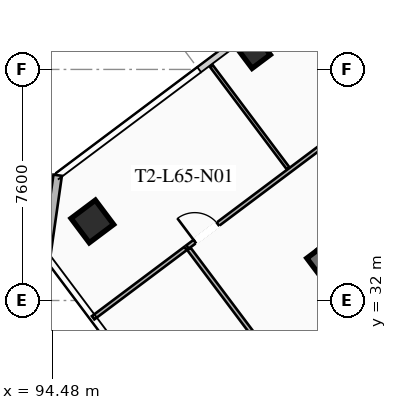
"""IFC4 building model, lengths in metres.
Left out: names, types, materials, properties, quantities, classifications, styles, units other than length and angle.
Written with IfcOpenShell. Run it as: python <this file> out.ifc"""

import sys

from ifc_helpers import new_model, si_unit, direction, frame, frame_2d, origin, origin_2d, place, context, subcontext, project, spatial, rectangle, hollow_rectangle, extrude, element, fill, save


model = new_model("IFC4")
c1 = context("Model", 3, precision=1e-05, world=origin(), true_north=direction((0.0, 1.0)))
c2 = subcontext(c1, "Body", "Model", "MODEL_VIEW")
j1 = project(units=[si_unit("LENGTHUNIT", "METRE"), si_unit("PLANEANGLEUNIT", "RADIAN")], contexts=[c1])
p1 = place(None, origin())
s1 = spatial("IfcSite", under=j1, at=p1, CompositionType="ELEMENT")
p2 = place(p1, origin())
s2 = spatial("IfcBuilding", under=s1, at=p2, CompositionType="ELEMENT")
p3 = place(p2, frame((0.0, 0.0, 239.7)))
s3 = spatial("IfcBuildingStorey", under=s2, at=p3, CompositionType="ELEMENT", Elevation=239.7)
p4 = place(p3, frame((112.396, 21.047, 0.0), z_axis=(0.0, 0.0, 1.0), x_axis=(-0.600005007985, 0.799996243986, 0.0)))
e1 = element("IfcWall", 1, at=p4, inside=s3, PredefinedType="SHEAR", context=c2, shape_type="SweptSolid", body=[
    extrude(rectangle(XDim=15.6, YDim=0.45, at=frame_2d((7.8, 0.0))), origin(), (0.0, 0.0, 1.0), 3.55),
])
p5 = place(p3, frame((95.8, 34.6, 0.0), z_axis=(0.0, 0.0, 1.0), x_axis=(0.799999996291, 0.600000004945, 0.0)))
e2 = element("IfcColumn", 2, at=p5, inside=s3, PredefinedType="COLUMN", context=c2, shape_type="SweptSolid", body=[
    extrude(hollow_rectangle(XDim=1.0, YDim=1.0, WallThickness=0.04, at=origin_2d()), origin(), (0.0, 0.0, 1.0), 3.37),
])
p6 = place(p3, frame((101.13, 40.16, 0.0), z_axis=(0.0, 0.0, 1.0), x_axis=(0.799999996291, 0.600000004945, 0.0)))
e3 = element("IfcColumn", 3, at=p6, inside=s3, PredefinedType="COLUMN", context=c2, shape_type="SweptSolid", body=[
    extrude(hollow_rectangle(XDim=0.75, YDim=0.75, WallThickness=0.032, at=origin_2d()), origin(), (0.0, 0.0, 1.0), 3.37),
])
p7 = place(p3, frame((94.28, 33.46, 0.0), z_axis=(0.0, 0.0, 1.0), x_axis=(0.141370477216, 0.989956760759, 0.0)))
e4 = element("IfcWall", 4, at=p7, inside=s3, PredefinedType="SOLIDWALL", context=c2, shape_type="SweptSolid", body=[
    extrude(rectangle(XDim=2.687, YDim=0.28, at=frame_2d((1.344, 0.0))), origin(), (0.0, 0.0, 1.0), 3.37),
])
p8 = place(p3, frame((98.93, 33.76, 0.0), z_axis=(0.0, 0.0, 1.0), x_axis=(0.8, 0.6, 0.0)))
e5 = element("IfcWall", 5, at=p8, inside=s3, PredefinedType="PARTITIONING", context=c2, shape_type="SweptSolid", body=[
    extrude(rectangle(XDim=23.85, YDim=0.135, at=frame_2d((11.925, 0.0))), origin(), (0.0, 0.0, 1.0), 2.723),
])
p9 = place(p8, frame((0.3, 0.0, 0.0)))
e6 = element("IfcOpeningElement", 6, at=p9, cuts=e5, PredefinedType="OPENING", context=c2, shape_type="SweptSolid", body=[
    extrude(rectangle(XDim=0.95, YDim=2.05, at=frame_2d((0.475, 1.025))), frame((0.0, 0.077, 0.0), z_axis=(0.0, -1.0, 0.0), x_axis=(1.0, 0.0, 0.0)), (0.0, 0.0, 1.0), 0.155),
])
p10 = place(p8, frame((10.779, 0.0, 0.0)))
e7 = element("IfcOpeningElement", 7, at=p10, cuts=e5, PredefinedType="OPENING", context=c2, shape_type="SweptSolid", body=[
    extrude(rectangle(XDim=0.95, YDim=2.05, at=frame_2d((0.475, 1.025))), frame((0.0, 0.077, 0.0), z_axis=(0.0, -1.0, 0.0), x_axis=(1.0, 0.0, 0.0)), (0.0, 0.0, 1.0), 0.155),
])
p11 = place(p8, frame((14.585, 0.0, 0.0)))
e8 = element("IfcOpeningElement", 8, at=p11, cuts=e5, PredefinedType="OPENING", context=c2, shape_type="SweptSolid", body=[
    extrude(rectangle(XDim=0.95, YDim=2.05, at=frame_2d((0.475, 1.025))), frame((0.0, 0.077, 0.0), z_axis=(0.0, -1.0, 0.0), x_axis=(1.0, 0.0, 0.0)), (0.0, 0.0, 1.0), 0.155),
])
p12 = place(p8, frame((22.6, 0.0, 0.0)))
e9 = element("IfcOpeningElement", 9, at=p12, cuts=e5, PredefinedType="OPENING", context=c2, shape_type="SweptSolid", body=[
    extrude(rectangle(XDim=0.95, YDim=2.05, at=frame_2d((0.475, 1.025))), frame((0.0, 0.077, 0.0), z_axis=(0.0, -1.0, 0.0), x_axis=(1.0, 0.0, 0.0)), (0.0, 0.0, 1.0), 0.155),
])
p13 = place(p3, frame((102.242, 36.344, 0.0), z_axis=(0.0, 0.0, 1.0), x_axis=(-0.59999069958, 0.80000697523, 0.0)))
e10 = element("IfcWall", 10, at=p13, inside=s3, PredefinedType="PARTITIONING", context=c2, shape_type="SweptSolid", body=[
    extrude(rectangle(XDim=4.2, YDim=0.11, at=frame_2d((2.1, 0.0))), origin(), (0.0, 0.0, 1.0), 2.723),
])
p14 = place(p3, frame((111.752, 16.664, 0.0), z_axis=(0.0, 0.0, 1.0), x_axis=(-0.599998165212, 0.800001376088, 0.0)))
e11 = element("IfcWall", 11, at=p14, inside=s3, PredefinedType="PARTITIONING", context=c2, shape_type="SweptSolid", body=[
    extrude(rectangle(XDim=21.29, YDim=0.135, at=frame_2d((10.645, 0.0))), origin(), (0.0, 0.0, 1.0), 2.723),
])
p15 = place(p14, frame((0.3, 0.0, 0.0)))
e12 = element("IfcOpeningElement", 12, at=p15, cuts=e11, PredefinedType="OPENING", context=c2, shape_type="SweptSolid", body=[
    extrude(rectangle(XDim=0.95, YDim=2.05, at=frame_2d((0.475, 1.025))), frame((0.0, 0.077, 0.0), z_axis=(0.0, -1.0, 0.0), x_axis=(1.0, 0.0, 0.0)), (0.0, 0.0, 1.0), 0.155),
])
p16 = place(p3, frame((98.866, 33.712, 0.0), z_axis=(0.0, 0.0, 1.0), x_axis=(-0.8, -0.6, 0.0)))
e13 = element("IfcWall", 13, at=p16, inside=s3, PredefinedType="PARTITIONING", context=c2, shape_type="SweptSolid", body=[
    extrude(rectangle(XDim=3.8, YDim=0.135, at=frame_2d((1.9, 0.0))), origin(), (0.0, 0.0, 1.0), 2.723),
])
p17 = place(p9, origin())
e14 = element("IfcDoor", 14, at=p17, inside=s3, OperationType="SINGLE_SWING_LEFT", PredefinedType="DOOR", context=c2, shape_type="SweptSolid", body=[
    extrude(rectangle(XDim=0.95, YDim=2.05, at=frame_2d((0.475, 1.025))), frame((0.0, 0.025, 0.0), z_axis=(0.0, -1.0, 0.0), x_axis=(1.0, 0.0, 0.0)), (0.0, 0.0, 1.0), 0.05),
])
fill(e6, e14)
save(model, sys.argv[1])
